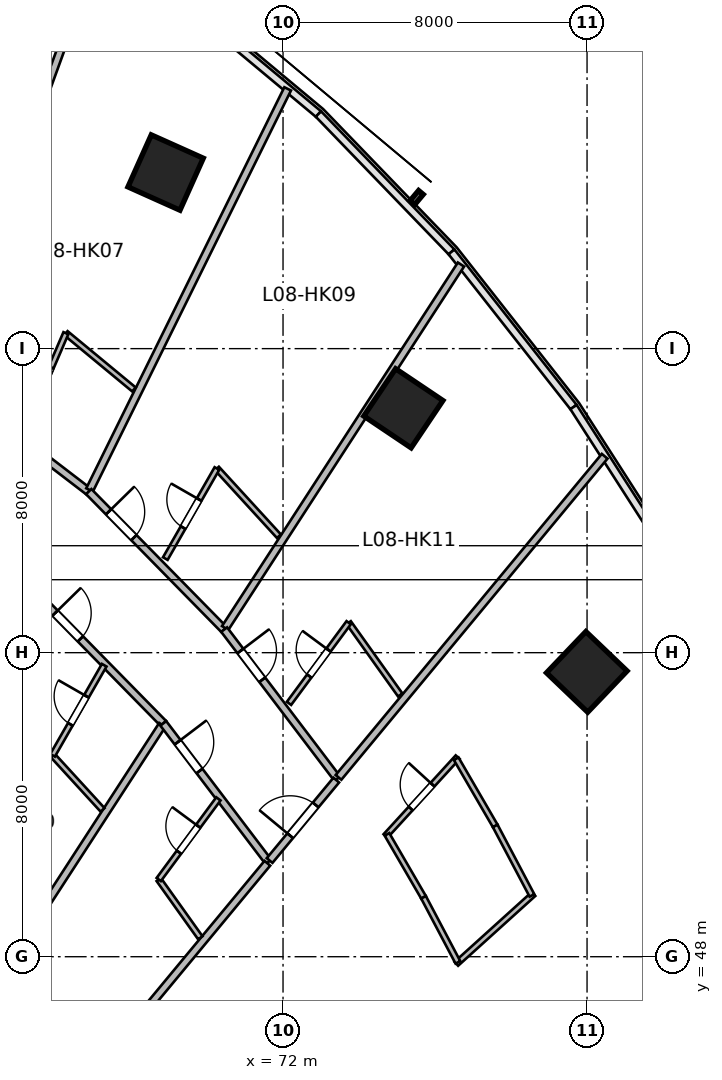
"""IFC4 building model, lengths in metres.
Left out: names, types, materials, properties, quantities, classifications, styles, units other than length and angle.
Written with IfcOpenShell. Run it as: python <this file> out.ifc"""

import sys

from ifc_helpers import new_model, si_unit, direction, frame, frame_2d, origin, origin_2d, place, context, subcontext, project, spatial, rectangle, extrude, source, transform, mapped, element, fill, save


model = new_model("IFC4")
c1 = context("Model", 3, precision=1e-05, world=origin(), true_north=direction((0.0, 1.0)))
c2 = subcontext(c1, "Body", "Model", "MODEL_VIEW")
j1 = project(units=[si_unit("LENGTHUNIT", "METRE"), si_unit("PLANEANGLEUNIT", "RADIAN")], contexts=[c1])
p1 = place(None, origin())
s1 = spatial("IfcSite", under=j1, at=p1, CompositionType="ELEMENT")
p2 = place(p1, origin())
s2 = spatial("IfcBuilding", under=s1, at=p2, CompositionType="ELEMENT")
p3 = place(p2, frame((0.0, 0.0, 42.6)))
s3 = spatial("IfcBuildingStorey", under=s2, at=p3, CompositionType="ELEMENT", Elevation=42.6)
m1 = source(origin(), c2, "Body", "SweptSolid", [
    extrude(rectangle(XDim=1.5, YDim=1.5, at=origin_2d()), origin(), (0.0, 0.0, 1.0), 3.6),
])
for number, where, z_axis, x_axis in (
    (1, (68.91, 68.633, 0.0), (0.0, 0.0, 1.0), (0.409, 0.912, 0.0)),
    (2, (75.167, 62.43, 0.0), (0.0, 0.0, 1.0), (0.558, 0.83, 0.0)),
    (3, (79.993, 55.494, 0.0), (0.0, 0.0, 1.0), (0.691, 0.723, 0.0)),
):
    element("IfcColumn", number, at=place(p3, frame(where, z_axis=z_axis, x_axis=x_axis)), inside=s3, PredefinedType="COLUMN", context=c2, shape_type="MappedRepresentation", body=[
        mapped(m1, transform((0.0, 0.0, 0.0), scale=1.0)),
    ])
m2 = source(origin(), c2, "Body", "SweptSolid", [
    extrude(rectangle(XDim=4.895, YDim=0.195, at=frame_2d((2.447, 0.0))), origin(), (0.0, 0.0, 1.0), 3.36),
])
p4 = place(p3, frame((63.001, 63.214, 0.0), z_axis=(0.0, 0.0, 1.0), x_axis=(0.793896075849, -0.608053468661, 0.0)))
e4 = element("IfcWall", 4, at=p4, inside=s3, PredefinedType="PARTITIONING", context=c2, shape_type="MappedRepresentation", body=[
    mapped(m2, transform((0.0, 0.0, 0.0), scale=1.0)),
])
p5 = place(p4, frame((0.7, 0.0, 0.0)))
e5 = element("IfcOpeningElement", 5, at=p5, cuts=e4, PredefinedType="OPENING", context=c2, shape_type="SweptSolid", body=[
    extrude(rectangle(XDim=0.95, YDim=2.15, at=frame_2d((0.475, 1.075))), frame((0.0, 0.107, 0.0), z_axis=(0.0, -1.0, 0.0), x_axis=(1.0, 0.0, 0.0)), (0.0, 0.0, 1.0), 0.215),
])
m3 = source(origin(), c2, "Body", "SweptSolid", [
    extrude(rectangle(XDim=12.088, YDim=0.195, at=frame_2d((6.044, 0.0))), origin(), (0.0, 0.0, 1.0), 3.36),
])
p6 = place(p3, frame((63.019, 63.262, 0.0), z_axis=(0.0, 0.0, 1.0), x_axis=(0.34203007529, 0.939689005787, 0.0)))
e6 = element("IfcWall", 6, at=p6, inside=s3, PredefinedType="PARTITIONING", context=c2, shape_type="MappedRepresentation", body=[
    mapped(m3, transform((0.0, 0.0, 0.0), scale=1.0)),
])
m4 = source(origin(), c2, "Body", "SweptSolid", [
    extrude(rectangle(XDim=11.77, YDim=0.195, at=frame_2d((5.885, 0.0))), origin(), (0.0, 0.0, 1.0), 3.36),
])
p7 = place(p3, frame((66.909, 60.282, 0.0), z_axis=(0.0, 0.0, 1.0), x_axis=(0.44286060326, 0.896590478468, 0.0)))
e7 = element("IfcWall", 7, at=p7, inside=s3, PredefinedType="PARTITIONING", context=c2, shape_type="MappedRepresentation", body=[
    mapped(m4, transform((0.0, 0.0, 0.0), scale=1.0)),
])
m5 = source(origin(), c2, "Body", "SweptSolid", [
    extrude(rectangle(XDim=2.324, YDim=0.14, at=frame_2d((1.162, 0.0))), origin(), (0.0, 0.0, 1.0), 3.36),
])
p8 = place(p3, frame((66.286, 64.407, 0.0), z_axis=(0.0, 0.0, 1.0), x_axis=(0.770746444956, -0.637141991701, 0.0)))
e8 = element("IfcWall", 8, at=p8, inside=s3, PredefinedType="PARTITIONING", context=c2, shape_type="MappedRepresentation", body=[
    mapped(m5, transform((0.0, 0.0, 0.0), scale=1.0)),
])
m6 = source(origin(), c2, "Body", "SweptSolid", [
    extrude(rectangle(XDim=2.818, YDim=0.14, at=frame_2d((1.409, 0.0))), origin(), (0.0, 0.0, 1.0), 3.36),
])
p9 = place(p3, frame((65.17, 61.819, 0.0), z_axis=(0.0, 0.0, 1.0), x_axis=(0.395894859341, 0.918295845764, 0.0)))
e9 = element("IfcWall", 9, at=p9, inside=s3, PredefinedType="PARTITIONING", context=c2, shape_type="MappedRepresentation", body=[
    mapped(m6, transform((0.0, 0.0, 0.0), scale=1.0)),
])
p10 = place(p9, frame((0.984, 0.0, 0.0)))
e10 = element("IfcOpeningElement", 10, at=p10, cuts=e9, PredefinedType="OPENING", context=c2, shape_type="SweptSolid", body=[
    extrude(rectangle(XDim=0.85, YDim=2.05, at=frame_2d((0.425, 1.025))), frame((0.0, 0.08, 0.0), z_axis=(0.0, -1.0, 0.0), x_axis=(1.0, 0.0, 0.0)), (0.0, 0.0, 1.0), 0.16),
])
m7 = source(origin(), c2, "Body", "SweptSolid", [
    extrude(rectangle(XDim=5.087, YDim=0.195, at=frame_2d((2.543, 0.0))), origin(), (0.0, 0.0, 1.0), 3.36),
])
p11 = place(p3, frame((66.887, 60.238, 0.0), z_axis=(0.0, 0.0, 1.0), x_axis=(0.700428330775, -0.7137227427, 0.0)))
e11 = element("IfcWall", 11, at=p11, inside=s3, PredefinedType="PARTITIONING", context=c2, shape_type="MappedRepresentation", body=[
    mapped(m7, transform((0.0, 0.0, 0.0), scale=1.0)),
])
p12 = place(p11, frame((0.746, 0.0, 0.0)))
e12 = element("IfcOpeningElement", 12, at=p12, cuts=e11, PredefinedType="OPENING", context=c2, shape_type="SweptSolid", body=[
    extrude(rectangle(XDim=0.95, YDim=2.15, at=frame_2d((0.475, 1.075))), frame((0.0, 0.107, 0.0), z_axis=(0.0, -1.0, 0.0), x_axis=(1.0, 0.0, 0.0)), (0.0, 0.0, 1.0), 0.215),
])
m8 = source(origin(), c2, "Body", "SweptSolid", [
    extrude(rectangle(XDim=11.403, YDim=0.195, at=frame_2d((5.701, 0.0))), origin(), (0.0, 0.0, 1.0), 3.36),
])
p13 = place(p3, frame((70.477, 56.647, 0.0), z_axis=(0.0, 0.0, 1.0), x_axis=(0.544246090008, 0.838925618581, 0.0)))
e13 = element("IfcWall", 13, at=p13, inside=s3, PredefinedType="PARTITIONING", context=c2, shape_type="MappedRepresentation", body=[
    mapped(m8, transform((0.0, 0.0, 0.0), scale=1.0)),
])
m9 = source(origin(), c2, "Body", "SweptSolid", [
    extrude(rectangle(XDim=2.416, YDim=0.14, at=frame_2d((1.208, 0.0))), origin(), (0.0, 0.0, 1.0), 3.36),
])
p14 = place(p3, frame((70.26, 60.846, 0.0), z_axis=(0.0, 0.0, 1.0), x_axis=(0.675399637907, -0.737451916476, 0.0)))
e14 = element("IfcWall", 14, at=p14, inside=s3, PredefinedType="PARTITIONING", context=c2, shape_type="MappedRepresentation", body=[
    mapped(m9, transform((0.0, 0.0, 0.0), scale=1.0)),
])
m10 = source(origin(), c2, "Body", "SweptSolid", [
    extrude(rectangle(XDim=2.732, YDim=0.14, at=frame_2d((1.366, 0.0))), origin(), (0.0, 0.0, 1.0), 3.36),
])
p15 = place(p3, frame((68.902, 58.476, 0.0), z_axis=(0.0, 0.0, 1.0), x_axis=(0.497254966372, 0.867604459658, 0.0)))
e15 = element("IfcWall", 15, at=p15, inside=s3, PredefinedType="PARTITIONING", context=c2, shape_type="MappedRepresentation", body=[
    mapped(m10, transform((0.0, 0.0, 0.0), scale=1.0)),
])
p16 = place(p15, frame((0.941, 0.0, 0.0)))
e16 = element("IfcOpeningElement", 16, at=p16, cuts=e15, PredefinedType="OPENING", context=c2, shape_type="SweptSolid", body=[
    extrude(rectangle(XDim=0.85, YDim=2.05, at=frame_2d((0.425, 1.025))), frame((0.0, 0.08, 0.0), z_axis=(0.0, -1.0, 0.0), x_axis=(1.0, 0.0, 0.0)), (0.0, 0.0, 1.0), 0.16),
])
m11 = source(origin(), c2, "Body", "SweptSolid", [
    extrude(rectangle(XDim=4.724, YDim=0.195, at=frame_2d((2.362, 0.0))), origin(), (0.0, 0.0, 1.0), 3.36),
])
p17 = place(p3, frame((65.541, 57.511, 0.0), z_axis=(0.0, 0.0, 1.0), x_axis=(0.700435057457, -0.713716141253, 0.0)))
e17 = element("IfcWall", 17, at=p17, inside=s3, PredefinedType="PARTITIONING", context=c2, shape_type="MappedRepresentation", body=[
    mapped(m11, transform((0.0, 0.0, 0.0), scale=1.0)),
])
p18 = place(p17, frame((0.659, 0.0, 0.0)))
e18 = element("IfcOpeningElement", 18, at=p18, cuts=e17, PredefinedType="OPENING", context=c2, shape_type="SweptSolid", body=[
    extrude(rectangle(XDim=0.95, YDim=2.15, at=frame_2d((0.475, 1.075))), frame((0.0, 0.107, 0.0), z_axis=(0.0, -1.0, 0.0), x_axis=(1.0, 0.0, 0.0)), (0.0, 0.0, 1.0), 0.215),
])
m12 = source(origin(), c2, "Body", "SweptSolid", [
    extrude(rectangle(XDim=11.429, YDim=0.195, at=frame_2d((5.714, 0.0))), origin(), (0.0, 0.0, 1.0), 3.36),
])
p19 = place(p3, frame((62.604, 44.511, 0.0), z_axis=(0.0, 0.0, 1.0), x_axis=(0.544215487077, 0.838945471187, 0.0)))
e19 = element("IfcWall", 19, at=p19, inside=s3, PredefinedType="PARTITIONING", context=c2, shape_type="MappedRepresentation", body=[
    mapped(m12, transform((0.0, 0.0, 0.0), scale=1.0)),
])
m13 = source(origin(), c2, "Body", "SweptSolid", [
    extrude(rectangle(XDim=1.947, YDim=0.14, at=frame_2d((0.973, 0.0))), origin(), (0.0, 0.0, 1.0), 2.803),
])
p20 = place(p3, frame((65.936, 53.3, 0.0), z_axis=(0.0, 0.0, 1.0), x_axis=(0.675383794012, -0.737466426888, 0.0)))
e20 = element("IfcWall", 20, at=p20, inside=s3, PredefinedType="PARTITIONING", context=c2, shape_type="MappedRepresentation", body=[
    mapped(m13, transform((0.0, 0.0, 0.0), scale=1.0)),
])
m14 = source(origin(), c2, "Body", "SweptSolid", [
    extrude(rectangle(XDim=2.731, YDim=0.14, at=frame_2d((1.366, 0.0))), origin(), (0.0, 0.0, 1.0), 3.36),
])
p21 = place(p3, frame((65.936, 53.3, 0.0), z_axis=(0.0, 0.0, 1.0), x_axis=(0.497120404056, 0.867681568244, 0.0)))
e21 = element("IfcWall", 21, at=p21, inside=s3, PredefinedType="PARTITIONING", context=c2, shape_type="MappedRepresentation", body=[
    mapped(m14, transform((0.0, 0.0, 0.0), scale=1.0)),
])
p22 = place(p21, frame((0.941, 0.0, 0.0)))
e22 = element("IfcOpeningElement", 22, at=p22, cuts=e21, PredefinedType="OPENING", context=c2, shape_type="SweptSolid", body=[
    extrude(rectangle(XDim=0.85, YDim=2.05, at=frame_2d((0.425, 1.025))), frame((0.0, 0.08, 0.0), z_axis=(0.0, -1.0, 0.0), x_axis=(1.0, 0.0, 0.0)), (0.0, 0.0, 1.0), 0.16),
])
m15 = source(origin(), c2, "Body", "SweptSolid", [
    extrude(rectangle(XDim=4.928, YDim=0.195, at=frame_2d((2.464, 0.0))), origin(), (0.0, 0.0, 1.0), 3.36),
])
p23 = place(p3, frame((70.45, 56.607, 0.0), z_axis=(0.0, 0.0, 1.0), x_axis=(0.604793043708, -0.796382680803, 0.0)))
e23 = element("IfcWall", 23, at=p23, inside=s3, PredefinedType="PARTITIONING", context=c2, shape_type="MappedRepresentation", body=[
    mapped(m15, transform((0.0, 0.0, 0.0), scale=1.0)),
])
p24 = place(p23, frame((0.708, 0.0, 0.0)))
e24 = element("IfcOpeningElement", 24, at=p24, cuts=e23, PredefinedType="OPENING", context=c2, shape_type="SweptSolid", body=[
    extrude(rectangle(XDim=0.95, YDim=2.15, at=frame_2d((0.475, 1.075))), frame((0.0, 0.107, 0.0), z_axis=(0.0, -1.0, 0.0), x_axis=(1.0, 0.0, 0.0)), (0.0, 0.0, 1.0), 0.215),
])
m16 = source(origin(), c2, "Body", "SweptSolid", [
    extrude(rectangle(XDim=10.975, YDim=0.195, at=frame_2d((5.487, 0.0))), origin(), (0.0, 0.0, 1.0), 3.36),
])
p25 = place(p3, frame((73.46, 52.719, 0.0), z_axis=(0.0, 0.0, 1.0), x_axis=(0.638125265812, 0.769932558821, 0.0)))
e25 = element("IfcWall", 25, at=p25, inside=s3, PredefinedType="PARTITIONING", context=c2, shape_type="MappedRepresentation", body=[
    mapped(m16, transform((0.0, 0.0, 0.0), scale=1.0)),
])
m17 = source(origin(), c2, "Body", "SweptSolid", [
    extrude(rectangle(XDim=2.337, YDim=0.14, at=frame_2d((1.169, 0.0))), origin(), (0.0, 0.0, 1.0), 3.36),
])
p26 = place(p3, frame((73.727, 56.789, 0.0), z_axis=(0.0, 0.0, 1.0), x_axis=(0.580862665959, -0.814001574504, 0.0)))
e26 = element("IfcWall", 26, at=p26, inside=s3, PredefinedType="PARTITIONING", context=c2, shape_type="MappedRepresentation", body=[
    mapped(m17, transform((0.0, 0.0, 0.0), scale=1.0)),
])
m18 = source(origin(), c2, "Body", "SweptSolid", [
    extrude(rectangle(XDim=2.64, YDim=0.14, at=frame_2d((1.32, 0.0))), origin(), (0.0, 0.0, 1.0), 3.36),
])
p27 = place(p3, frame((72.157, 54.666, 0.0), z_axis=(0.0, 0.0, 1.0), x_axis=(0.594630255283, 0.803999290735, 0.0)))
e27 = element("IfcWall", 27, at=p27, inside=s3, PredefinedType="PARTITIONING", context=c2, shape_type="MappedRepresentation", body=[
    mapped(m18, transform((0.0, 0.0, 0.0), scale=1.0)),
])
p28 = place(p27, frame((0.895, 0.0, 0.0)))
e28 = element("IfcOpeningElement", 28, at=p28, cuts=e27, PredefinedType="OPENING", context=c2, shape_type="SweptSolid", body=[
    extrude(rectangle(XDim=0.85, YDim=2.05, at=frame_2d((0.425, 1.025))), frame((0.0, 0.08, 0.0), z_axis=(0.0, -1.0, 0.0), x_axis=(1.0, 0.0, 0.0)), (0.0, 0.0, 1.0), 0.16),
])
m19 = source(origin(), c2, "Body", "SweptSolid", [
    extrude(rectangle(XDim=4.576, YDim=0.195, at=frame_2d((2.288, 0.0))), origin(), (0.0, 0.0, 1.0), 3.36),
])
p29 = place(p3, frame((68.85, 54.139, 0.0), z_axis=(0.0, 0.0, 1.0), x_axis=(0.604795096156, -0.796381122118, 0.0)))
e29 = element("IfcWall", 29, at=p29, inside=s3, PredefinedType="PARTITIONING", context=c2, shape_type="MappedRepresentation", body=[
    mapped(m19, transform((0.0, 0.0, 0.0), scale=1.0)),
])
p30 = place(p29, frame((0.623, 0.0, 0.0)))
e30 = element("IfcOpeningElement", 30, at=p30, cuts=e29, PredefinedType="OPENING", context=c2, shape_type="SweptSolid", body=[
    extrude(rectangle(XDim=0.95, YDim=2.15, at=frame_2d((0.475, 1.075))), frame((0.0, 0.107, 0.0), z_axis=(0.0, -1.0, 0.0), x_axis=(1.0, 0.0, 0.0)), (0.0, 0.0, 1.0), 0.215),
])
m20 = source(origin(), c2, "Body", "SweptSolid", [
    extrude(rectangle(XDim=11.053, YDim=0.195, at=frame_2d((5.527, 0.0))), origin(), (0.0, 0.0, 1.0), 3.36),
])
p31 = place(p3, frame((64.534, 41.949, 0.0), z_axis=(0.0, 0.0, 1.0), x_axis=(0.638131235571, 0.769927611005, 0.0)))
e31 = element("IfcWall", 31, at=p31, inside=s3, PredefinedType="PARTITIONING", context=c2, shape_type="MappedRepresentation", body=[
    mapped(m20, transform((0.0, 0.0, 0.0), scale=1.0)),
])
m21 = source(origin(), c2, "Body", "SweptSolid", [
    extrude(rectangle(XDim=1.884, YDim=0.14, at=frame_2d((0.942, 0.0))), origin(), (0.0, 0.0, 1.0), 2.803),
])
p32 = place(p3, frame((68.729, 50.031, 0.0), z_axis=(0.0, 0.0, 1.0), x_axis=(0.580833492897, -0.814022391295, 0.0)))
e32 = element("IfcWall", 32, at=p32, inside=s3, PredefinedType="PARTITIONING", context=c2, shape_type="MappedRepresentation", body=[
    mapped(m21, transform((0.0, 0.0, 0.0), scale=1.0)),
])
p33 = place(p3, frame((68.729, 50.031, 0.0), z_axis=(0.0, 0.0, 1.0), x_axis=(0.594674469522, 0.803966588422, 0.0)))
e33 = element("IfcWall", 33, at=p33, inside=s3, PredefinedType="PARTITIONING", context=c2, shape_type="MappedRepresentation", body=[
    mapped(m18, transform((0.0, 0.0, 0.0), scale=1.0)),
])
p34 = place(p33, frame((0.895, 0.0, 0.0)))
e34 = element("IfcOpeningElement", 34, at=p34, cuts=e33, PredefinedType="OPENING", context=c2, shape_type="SweptSolid", body=[
    extrude(rectangle(XDim=0.85, YDim=2.05, at=frame_2d((0.425, 1.025))), frame((0.0, 0.08, 0.0), z_axis=(0.0, -1.0, 0.0), x_axis=(1.0, 0.0, 0.0)), (0.0, 0.0, 1.0), 0.16),
])
m22 = source(origin(), c2, "Body", "SweptSolid", [
    extrude(rectangle(XDim=2.748, YDim=0.195, at=frame_2d((1.374, 0.0))), origin(), (0.0, 0.0, 1.0), 3.36),
])
p35 = place(p3, frame((71.647, 50.531, 0.0), z_axis=(0.0, 0.0, 1.0), x_axis=(0.638111168284, 0.769944242729, 0.0)))
e35 = element("IfcWall", 35, at=p35, inside=s3, PredefinedType="PARTITIONING", context=c2, shape_type="MappedRepresentation", body=[
    mapped(m22, transform((0.0, 0.0, 0.0), scale=1.0)),
])
p36 = place(p35, frame((0.849, 0.0, 0.0)))
e36 = element("IfcOpeningElement", 36, at=p36, cuts=e35, PredefinedType="OPENING", context=c2, shape_type="SweptSolid", body=[
    extrude(rectangle(XDim=1.05, YDim=2.15, at=frame_2d((0.525, 1.075))), frame((0.0, 0.107, 0.0), z_axis=(0.0, -1.0, 0.0), x_axis=(1.0, 0.0, 0.0)), (0.0, 0.0, 1.0), 0.215),
])
m23 = source(origin(), c2, "Body", "SweptSolid", [
    extrude(rectangle(XDim=2.812, YDim=0.14, at=frame_2d((1.406, 0.0))), origin(), (0.0, 0.0, 1.0), 3.36),
])
p37 = place(p3, frame((74.697, 51.177, 0.0), z_axis=(0.0, 0.0, 1.0), x_axis=(0.675119025852, 0.737708818527, 0.0)))
e37 = element("IfcWall", 37, at=p37, inside=s3, PredefinedType="PARTITIONING", context=c2, shape_type="MappedRepresentation", body=[
    mapped(m23, transform((0.0, 0.0, 0.0), scale=1.0)),
])
p38 = place(p37, frame((0.981, 0.0, 0.0)))
e38 = element("IfcOpeningElement", 38, at=p38, cuts=e37, PredefinedType="OPENING", context=c2, shape_type="SweptSolid", body=[
    extrude(rectangle(XDim=0.85, YDim=2.05, at=frame_2d((0.425, 1.025))), frame((0.0, 0.08, 0.0), z_axis=(0.0, -1.0, 0.0), x_axis=(1.0, 0.0, 0.0)), (0.0, 0.0, 1.0), 0.16),
])
m24 = source(origin(), c2, "Body", "SweptSolid", [
    extrude(rectangle(XDim=2.738, YDim=0.14, at=frame_2d((1.369, 0.0))), origin(), (0.0, 0.0, 1.0), 3.36),
])
p39 = place(p3, frame((76.56, 47.814, 0.0), z_axis=(0.0, 0.0, 1.0), x_axis=(0.741873676582, 0.670539669218, 0.0)))
e39 = element("IfcWall", 39, at=p39, inside=s3, PredefinedType="PARTITIONING", context=c2, shape_type="MappedRepresentation", body=[
    mapped(m24, transform((0.0, 0.0, 0.0), scale=1.0)),
])
m25 = source(origin(), c2, "Body", "SweptSolid", [
    extrude(rectangle(XDim=1.914, YDim=0.14, at=frame_2d((0.957, 0.0))), origin(), (0.0, 0.0, 1.0), 3.36),
])
p40 = place(p3, frame((74.736, 51.219, 0.0), z_axis=(0.0, 0.0, 1.0), x_axis=(0.502347790612, -0.864665656347, 0.0)))
e40 = element("IfcWall", 40, at=p40, inside=s3, PredefinedType="PARTITIONING", context=c2, shape_type="MappedRepresentation", body=[
    mapped(m25, transform((0.0, 0.0, 0.0), scale=1.0)),
])
m26 = source(origin(), c2, "Body", "SweptSolid", [
    extrude(rectangle(XDim=2.045, YDim=0.14, at=frame_2d((1.022, 0.0))), origin(), (0.0, 0.0, 1.0), 3.36),
])
p41 = place(p3, frame((76.557, 53.209, 0.0), z_axis=(0.0, 0.0, 1.0), x_axis=(0.5023112139, -0.864686905411, 0.0)))
e41 = element("IfcWall", 41, at=p41, inside=s3, PredefinedType="PARTITIONING", context=c2, shape_type="MappedRepresentation", body=[
    mapped(m26, transform((0.0, 0.0, 0.0), scale=1.0)),
])
m27 = source(origin(), c2, "Body", "SweptSolid", [
    extrude(rectangle(XDim=1.936, YDim=0.14, at=frame_2d((0.968, 0.0))), origin(), (0.0, 0.0, 1.0), 3.36),
])
p42 = place(p3, frame((75.697, 49.563, 0.0), z_axis=(0.0, 0.0, 1.0), x_axis=(0.467174971862, -0.884164886017, 0.0)))
e42 = element("IfcWall", 42, at=p42, inside=s3, PredefinedType="PARTITIONING", context=c2, shape_type="MappedRepresentation", body=[
    mapped(m27, transform((0.0, 0.0, 0.0), scale=1.0)),
])
m28 = source(origin(), c2, "Body", "SweptSolid", [
    extrude(rectangle(XDim=2.068, YDim=0.14, at=frame_2d((1.034, 0.0))), origin(), (0.0, 0.0, 1.0), 3.36),
])
p43 = place(p3, frame((77.584, 51.441, 0.0), z_axis=(0.0, 0.0, 1.0), x_axis=(0.467215057643, -0.884143704333, 0.0)))
e43 = element("IfcWall", 43, at=p43, inside=s3, PredefinedType="PARTITIONING", context=c2, shape_type="MappedRepresentation", body=[
    mapped(m28, transform((0.0, 0.0, 0.0), scale=1.0)),
])
m29 = source(origin(), c2, "Body", "SweptSolid", [
    extrude(rectangle(XDim=0.95, YDim=2.15, at=frame_2d((0.475, 1.075))), frame((0.0, 0.025, 0.0), z_axis=(0.0, -1.0, 0.0), x_axis=(1.0, 0.0, 0.0)), (0.0, 0.0, 1.0), 0.05),
])
p44 = place(p12, origin())
e44 = element("IfcDoor", 44, at=p44, inside=s3, OperationType="SINGLE_SWING_LEFT", PredefinedType="DOOR", context=c2, shape_type="MappedRepresentation", body=[
    mapped(m29, transform((0.0, 0.0, 0.0), scale=1.0)),
])
fill(e12, e44)
m30 = source(origin(), c2, "Body", "SweptSolid", [
    extrude(rectangle(XDim=0.85, YDim=2.05, at=frame_2d((0.425, 1.025))), frame((0.0, 0.025, 0.0), z_axis=(0.0, -1.0, 0.0), x_axis=(1.0, 0.0, 0.0)), (0.0, 0.0, 1.0), 0.05),
])
p45 = place(p16, origin())
e45 = element("IfcDoor", 45, at=p45, inside=s3, OperationType="SINGLE_SWING_RIGHT", PredefinedType="DOOR", context=c2, shape_type="MappedRepresentation", body=[
    mapped(m30, transform((0.0, 0.0, 0.0), scale=1.0)),
])
fill(e16, e45)
p46 = place(p18, origin())
e46 = element("IfcDoor", 46, at=p46, inside=s3, OperationType="SINGLE_SWING_LEFT", PredefinedType="DOOR", context=c2, shape_type="MappedRepresentation", body=[
    mapped(m29, transform((0.0, 0.0, 0.0), scale=1.0)),
])
fill(e18, e46)
p47 = place(p22, origin())
e47 = element("IfcDoor", 47, at=p47, inside=s3, OperationType="SINGLE_SWING_RIGHT", PredefinedType="DOOR", context=c2, shape_type="MappedRepresentation", body=[
    mapped(m30, transform((0.0, 0.0, 0.0), scale=1.0)),
])
fill(e22, e47)
p48 = place(p24, origin())
e48 = element("IfcDoor", 48, at=p48, inside=s3, OperationType="SINGLE_SWING_LEFT", PredefinedType="DOOR", context=c2, shape_type="MappedRepresentation", body=[
    mapped(m29, transform((0.0, 0.0, 0.0), scale=1.0)),
])
fill(e24, e48)
p49 = place(p28, origin())
e49 = element("IfcDoor", 49, at=p49, inside=s3, OperationType="SINGLE_SWING_RIGHT", PredefinedType="DOOR", context=c2, shape_type="MappedRepresentation", body=[
    mapped(m30, transform((0.0, 0.0, 0.0), scale=1.0)),
])
fill(e28, e49)
p50 = place(p30, origin())
e50 = element("IfcDoor", 50, at=p50, inside=s3, OperationType="SINGLE_SWING_LEFT", PredefinedType="DOOR", context=c2, shape_type="MappedRepresentation", body=[
    mapped(m29, transform((0.0, 0.0, 0.0), scale=1.0)),
])
fill(e30, e50)
p51 = place(p34, origin())
e51 = element("IfcDoor", 51, at=p51, inside=s3, OperationType="SINGLE_SWING_RIGHT", PredefinedType="DOOR", context=c2, shape_type="MappedRepresentation", body=[
    mapped(m30, transform((0.0, 0.0, 0.0), scale=1.0)),
])
fill(e34, e51)
m31 = source(origin(), c2, "Body", "SweptSolid", [
    extrude(rectangle(XDim=1.05, YDim=2.15, at=frame_2d((0.525, 1.075))), frame((0.0, 0.025, 0.0), z_axis=(0.0, -1.0, 0.0), x_axis=(1.0, 0.0, 0.0)), (0.0, 0.0, 1.0), 0.05),
])
p52 = place(p36, origin())
e52 = element("IfcDoor", 52, at=p52, inside=s3, OperationType="SINGLE_SWING_LEFT", PredefinedType="DOOR", context=c2, shape_type="MappedRepresentation", body=[
    mapped(m31, transform((0.0, 0.0, 0.0), scale=1.0)),
])
fill(e36, e52)
p53 = place(p38, origin())
e53 = element("IfcDoor", 53, at=p53, inside=s3, OperationType="SINGLE_SWING_RIGHT", PredefinedType="DOOR", context=c2, shape_type="MappedRepresentation", body=[
    mapped(m30, transform((0.0, 0.0, 0.0), scale=1.0)),
])
fill(e38, e53)
save(model, sys.argv[1])
